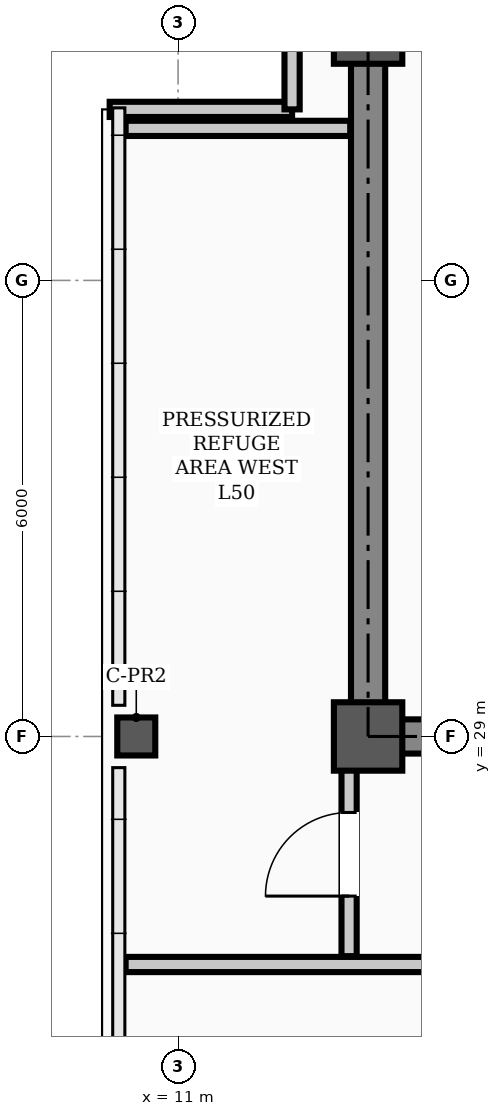
"""IFC4 building model, lengths in metres.
Left out: names, types, materials, properties, quantities, classifications, styles, units other than length and angle.
Written with IfcOpenShell. Run it as: python <this file> out.ifc"""

import sys

from ifc_helpers import new_model, si_unit, direction, frame, frame_2d, origin, origin_2d, place, context, subcontext, project, spatial, rectangle, hollow_rectangle, extrude, element, fill, save


model = new_model("IFC4")
c1 = context("Model", 3, precision=1e-05, world=origin(), true_north=direction((0.0, 1.0)))
c2 = subcontext(c1, "Body", "Model", "MODEL_VIEW")
j1 = project(units=[si_unit("LENGTHUNIT", "METRE"), si_unit("PLANEANGLEUNIT", "RADIAN")], contexts=[c1])
p1 = place(None, origin())
s1 = spatial("IfcSite", under=j1, at=p1, CompositionType="ELEMENT")
p2 = place(p1, origin())
s2 = spatial("IfcBuilding", under=s1, at=p2, CompositionType="ELEMENT")
p3 = place(p2, frame((0.0, 0.0, 200.7)))
s3 = spatial("IfcBuildingStorey", under=s2, at=p3, CompositionType="ELEMENT", Elevation=200.7)
for number, where, z_axis, x_axis in (
    (1, (13.5, 29.0, 0.0), (0.0, 0.0, 1.0), (1.0, 0.0, 0.0)),
    (2, (13.5, 38.3, 0.0), (0.0, 0.0, 1.0), (1.0, 0.0, 0.0)),
):
    element("IfcColumn", number, at=place(p3, frame(where, z_axis=z_axis, x_axis=x_axis)), inside=s3, PredefinedType="COLUMN", context=c2, shape_type="SweptSolid", body=[
        extrude(hollow_rectangle(XDim=0.9, YDim=0.9, WallThickness=0.035, InnerFilletRadius=0.017, OuterFilletRadius=0.052, at=origin_2d()), origin(), (0.0, 0.0, 1.0), 5.4),
    ])
p4 = place(p3, frame((10.45, 29.0, 0.0), z_axis=(0.0, 0.0, 1.0), x_axis=(1.0, 0.0, 0.0)))
e3 = element("IfcColumn", 3, at=p4, inside=s3, PredefinedType="COLUMN", context=c2, shape_type="SweptSolid", body=[
    extrude(hollow_rectangle(XDim=0.5, YDim=0.5, WallThickness=0.024, InnerFilletRadius=0.012, OuterFilletRadius=0.036, at=origin_2d()), origin(), (0.0, 0.0, 1.0), 5.4),
])
for number, where, z_axis, x_axis in (
    (4, (10.1, 37.25, 0.0), (0.0, 0.0, 1.0), (1.0, 0.0, 0.0)),
    (5, (12.5, 37.25, 0.0), (0.0, 0.0, 1.0), (0.0, 1.0, 0.0)),
):
    element("IfcWall", number, at=place(p3, frame(where, z_axis=z_axis, x_axis=x_axis)), inside=s3, PredefinedType="PARAPET", context=c2, shape_type="SweptSolid", body=[
        extrude(rectangle(XDim=2.4, YDim=0.2, at=frame_2d((1.2, 0.0))), origin(), (0.0, 0.0, 1.0), 1.2),
    ])
p5 = place(p3, frame((13.5, 29.0, 0.0), z_axis=(0.0, 0.0, 1.0), x_axis=(1.0, 0.0, 0.0)))
e6 = element("IfcWall", 6, at=p5, inside=s3, PredefinedType="SHEAR", context=c2, shape_type="SweptSolid", body=[
    extrude(rectangle(XDim=30.5, YDim=0.45, at=frame_2d((15.25, 0.0))), origin(), (0.0, 0.0, 1.0), 5.22),
])
p6 = place(p5, frame((1.75, 0.0, 0.0)))
e7 = element("IfcOpeningElement", 7, at=p6, cuts=e6, PredefinedType="OPENING", context=c2, shape_type="SweptSolid", body=[
    extrude(rectangle(XDim=1.1, YDim=2.08, at=frame_2d((0.55, 1.04))), frame((0.0, 0.235, 0.0), z_axis=(0.0, -1.0, 0.0), x_axis=(1.0, 0.0, 0.0)), (0.0, 0.0, 1.0), 0.47),
])
p7 = place(p5, frame((26.7, 0.0, 0.0)))
e8 = element("IfcOpeningElement", 8, at=p7, cuts=e6, PredefinedType="OPENING", context=c2, shape_type="SweptSolid", body=[
    extrude(rectangle(XDim=1.1, YDim=2.08, at=frame_2d((0.55, 1.04))), frame((0.0, 0.235, 0.0), z_axis=(0.0, -1.0, 0.0), x_axis=(1.0, 0.0, 0.0)), (0.0, 0.0, 1.0), 0.47),
])
p8 = place(p5, frame((6.8, 0.0, 0.0)))
e9 = element("IfcOpeningElement", 9, at=p8, cuts=e6, PredefinedType="OPENING", context=c2, shape_type="SweptSolid", body=[
    extrude(rectangle(XDim=1.1, YDim=2.08, at=frame_2d((0.55, 1.04))), frame((0.0, 0.235, 0.0), z_axis=(0.0, -1.0, 0.0), x_axis=(1.0, 0.0, 0.0)), (0.0, 0.0, 1.0), 0.47),
])
p9 = place(p5, frame((13.2, 0.0, 0.0)))
e10 = element("IfcOpeningElement", 10, at=p9, cuts=e6, PredefinedType="OPENING", context=c2, shape_type="SweptSolid", body=[
    extrude(rectangle(XDim=1.6, YDim=2.08, at=frame_2d((0.8, 1.04))), frame((0.0, 0.235, 0.0), z_axis=(0.0, -1.0, 0.0), x_axis=(1.0, 0.0, 0.0)), (0.0, 0.0, 1.0), 0.47),
])
p10 = place(p5, frame((20.525, 0.0, 0.0)))
e11 = element("IfcOpeningElement", 11, at=p10, cuts=e6, PredefinedType="OPENING", context=c2, shape_type="SweptSolid", body=[
    extrude(rectangle(XDim=0.95, YDim=2.08, at=frame_2d((0.475, 1.04))), frame((0.0, 0.235, 0.0), z_axis=(0.0, -1.0, 0.0), x_axis=(1.0, 0.0, 0.0)), (0.0, 0.0, 1.0), 0.47),
])
p11 = place(p3, frame((13.5, 29.35, 0.0), z_axis=(0.0, 0.0, 1.0), x_axis=(0.0, 1.0, 0.0)))
e12 = element("IfcWall", 12, at=p11, inside=s3, PredefinedType="SHEAR", context=c2, shape_type="SweptSolid", body=[
    extrude(rectangle(XDim=8.6, YDim=0.45, at=frame_2d((4.3, 0.0))), origin(), (0.0, 0.0, 1.0), 5.22),
])
p12 = place(p3, frame((10.31, 26.0, 0.0), z_axis=(0.0, 0.0, 1.0), x_axis=(1.0, 0.0, 0.0)))
e13 = element("IfcWall", 13, at=p12, inside=s3, PredefinedType="STANDARD", context=c2, shape_type="SweptSolid", body=[
    extrude(rectangle(XDim=43.38, YDim=0.2, at=frame_2d((21.69, 0.0))), origin(), (0.0, 0.0, 1.0), 4.7),
])
p13 = place(p12, frame((8.34, 0.0, 0.0)))
e14 = element("IfcOpeningElement", 14, at=p13, cuts=e13, PredefinedType="OPENING", context=c2, shape_type="SweptSolid", body=[
    extrude(rectangle(XDim=1.1, YDim=2.08, at=frame_2d((0.55, 1.04))), frame((0.0, 0.11, 0.0), z_axis=(0.0, -1.0, 0.0), x_axis=(1.0, 0.0, 0.0)), (0.0, 0.0, 1.0), 0.22),
])
p14 = place(p12, frame((16.39, 0.0, 0.0)))
e15 = element("IfcOpeningElement", 15, at=p14, cuts=e13, PredefinedType="OPENING", context=c2, shape_type="SweptSolid", body=[
    extrude(rectangle(XDim=1.6, YDim=2.08, at=frame_2d((0.8, 1.04))), frame((0.0, 0.11, 0.0), z_axis=(0.0, -1.0, 0.0), x_axis=(1.0, 0.0, 0.0)), (0.0, 0.0, 1.0), 0.22),
])
p15 = place(p12, frame((23.39, 0.0, 0.0)))
e16 = element("IfcOpeningElement", 16, at=p15, cuts=e13, PredefinedType="OPENING", context=c2, shape_type="SweptSolid", body=[
    extrude(rectangle(XDim=1.1, YDim=2.08, at=frame_2d((0.55, 1.04))), frame((0.0, 0.11, 0.0), z_axis=(0.0, -1.0, 0.0), x_axis=(1.0, 0.0, 0.0)), (0.0, 0.0, 1.0), 0.22),
])
p16 = place(p12, frame((29.89, 0.0, 0.0)))
e17 = element("IfcOpeningElement", 17, at=p16, cuts=e13, PredefinedType="OPENING", context=c2, shape_type="SweptSolid", body=[
    extrude(rectangle(XDim=1.1, YDim=2.08, at=frame_2d((0.55, 1.04))), frame((0.0, 0.11, 0.0), z_axis=(0.0, -1.0, 0.0), x_axis=(1.0, 0.0, 0.0)), (0.0, 0.0, 1.0), 0.22),
])
p17 = place(p3, frame((10.31, 37.0, 0.0), z_axis=(0.0, 0.0, 1.0), x_axis=(1.0, 0.0, 0.0)))
e18 = element("IfcWall", 18, at=p17, inside=s3, PredefinedType="STANDARD", context=c2, shape_type="SweptSolid", body=[
    extrude(rectangle(XDim=2.955, YDim=0.2, at=frame_2d((1.478, 0.0))), origin(), (0.0, 0.0, 1.0), 4.7),
])
p18 = place(p3, frame((13.25, 26.11, 0.0), z_axis=(0.0, 0.0, 1.0), x_axis=(0.0, 1.0, 0.0)))
e19 = element("IfcWall", 19, at=p18, inside=s3, PredefinedType="STANDARD", context=c2, shape_type="SweptSolid", body=[
    extrude(rectangle(XDim=3.24, YDim=0.2, at=frame_2d((1.62, 0.0))), origin(), (0.0, 0.0, 1.0), 4.6),
])
p19 = place(p18, frame((0.79, 0.0, 0.0)))
e20 = element("IfcOpeningElement", 20, at=p19, cuts=e19, PredefinedType="OPENING", context=c2, shape_type="SweptSolid", body=[
    extrude(rectangle(XDim=1.1, YDim=2.08, at=frame_2d((0.55, 1.04))), frame((0.0, 0.11, 0.0), z_axis=(0.0, -1.0, 0.0), x_axis=(1.0, 0.0, 0.0)), (0.0, 0.0, 1.0), 0.22),
])
p20 = place(p19, origin())
e21 = element("IfcDoor", 21, at=p20, inside=s3, OperationType="SINGLE_SWING_LEFT", PredefinedType="DOOR", context=c2, shape_type="SweptSolid", body=[
    extrude(rectangle(XDim=1.1, YDim=2.08, at=frame_2d((0.55, 1.04))), frame((0.0, 0.025, 0.0), z_axis=(0.0, -1.0, 0.0), x_axis=(1.0, 0.0, 0.0)), (0.0, 0.0, 1.0), 0.05),
])
fill(e20, e21)
save(model, sys.argv[1])
